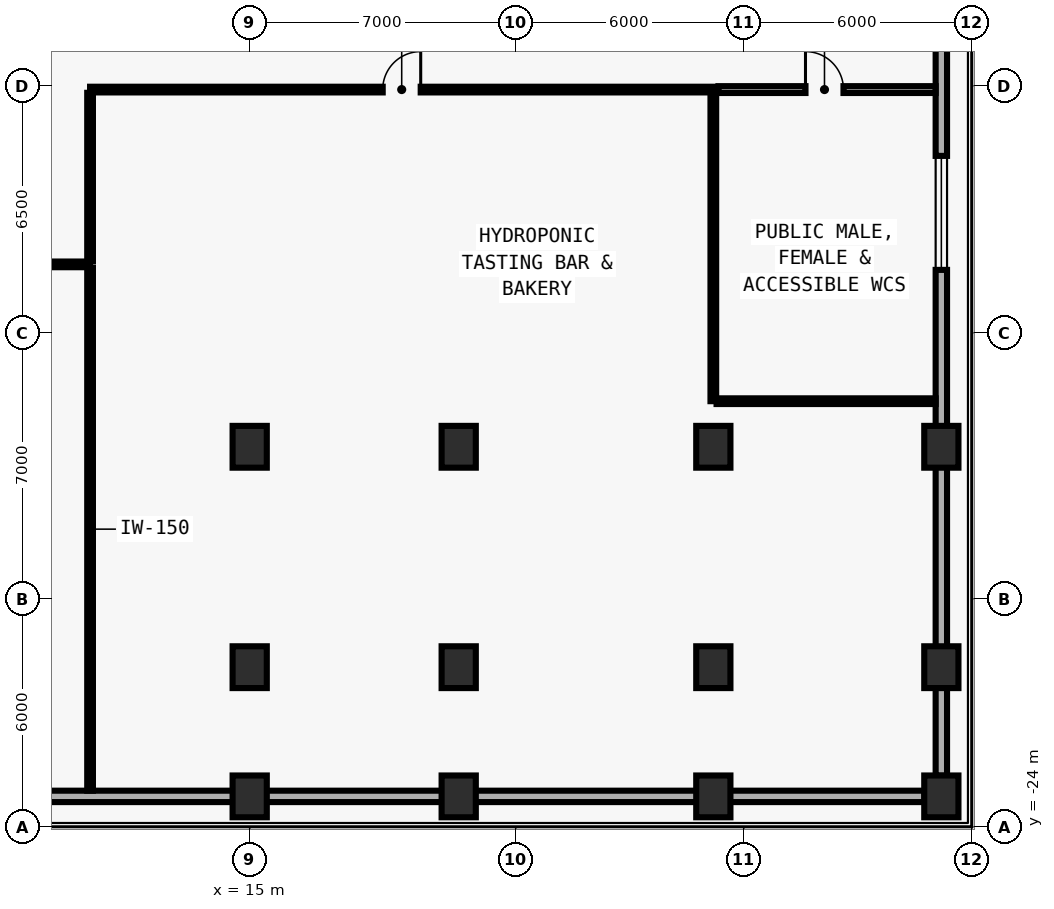
"""IFC4 building model, lengths in metres.
Left out: names, types, materials, properties, quantities, classifications, styles, units other than length and angle.
Written with IfcOpenShell. Run it as: python <this file> out.ifc"""

import sys

from ifc_helpers import new_model, si_unit, direction, frame, frame_2d, origin, origin_2d, place, context, subcontext, project, spatial, rectangle, extrude, element, fill, save


model = new_model("IFC4")
c1 = context("Model", 3, precision=1e-05, world=origin(), true_north=direction((0.0, 1.0)))
c2 = subcontext(c1, "Body", "Model", "MODEL_VIEW")
j1 = project(units=[si_unit("LENGTHUNIT", "METRE"), si_unit("PLANEANGLEUNIT", "RADIAN")], contexts=[c1])
p1 = place(None, origin())
s1 = spatial("IfcSite", under=j1, at=p1, CompositionType="ELEMENT")
p2 = place(p1, origin())
s2 = spatial("IfcBuilding", under=s1, at=p2, CompositionType="ELEMENT")
p3 = place(p2, frame((0.0, 0.0, 4.6)))
s3 = spatial("IfcBuildingStorey", under=s2, at=p3, CompositionType="ELEMENT", Elevation=4.6)
for number, where, z_axis, x_axis in (
    (1, (15.0, -23.2, 0.0), (0.0, 0.0, 1.0), (1.0, 0.0, 0.0)),
    (2, (15.0, -19.8, 0.0), (0.0, 0.0, 1.0), (1.0, 0.0, 0.0)),
    (3, (15.0, -14.0, 0.0), (0.0, 0.0, 1.0), (1.0, 0.0, 0.0)),
    (4, (20.5, -23.2, 0.0), (0.0, 0.0, 1.0), (1.0, 0.0, 0.0)),
    (5, (20.5, -19.8, 0.0), (0.0, 0.0, 1.0), (1.0, 0.0, 0.0)),
    (6, (20.5, -14.0, 0.0), (0.0, 0.0, 1.0), (1.0, 0.0, 0.0)),
    (7, (27.2, -23.2, 0.0), (0.0, 0.0, 1.0), (1.0, 0.0, 0.0)),
    (8, (27.2, -19.8, 0.0), (0.0, 0.0, 1.0), (1.0, 0.0, 0.0)),
    (9, (27.2, -14.0, 0.0), (0.0, 0.0, 1.0), (1.0, 0.0, 0.0)),
    (10, (33.2, -23.2, 0.0), (0.0, 0.0, 1.0), (1.0, 0.0, 0.0)),
    (11, (33.2, -19.8, 0.0), (0.0, 0.0, 1.0), (1.0, 0.0, 0.0)),
    (12, (33.2, -14.0, 0.0), (0.0, 0.0, 1.0), (1.0, 0.0, 0.0)),
):
    element("IfcColumn", number, at=place(p3, frame(where, z_axis=z_axis, x_axis=x_axis)), inside=s3, PredefinedType="COLUMN", context=c2, shape_type="SweptSolid", body=[
        extrude(rectangle(XDim=0.9, YDim=1.1, at=origin_2d()), origin(), (0.0, 0.0, 1.0), 4.575),
    ])
p4 = place(p3, frame((33.2, 22.655, 0.0), z_axis=(0.0, 0.0, 1.0), x_axis=(0.0, -1.0, 0.0)))
e13 = element("IfcWall", 13, at=p4, inside=s3, PredefinedType="SOLIDWALL", context=c2, shape_type="SweptSolid", body=[
    extrude(rectangle(XDim=45.31, YDim=0.3, at=frame_2d((22.655, 0.0))), origin(), (0.0, 0.0, 1.0), 3.35),
])
p5 = place(p4, frame((29.0, 0.0, 0.85)))
e14 = element("IfcOpeningElement", 14, at=p5, cuts=e13, PredefinedType="OPENING", context=c2, shape_type="SweptSolid", body=[
    extrude(rectangle(XDim=3.0, YDim=2.1, at=frame_2d((1.5, 1.05))), frame((0.0, 0.16, 0.0), z_axis=(0.0, -1.0, 0.0), x_axis=(1.0, 0.0, 0.0)), (0.0, 0.0, 1.0), 0.32),
])
p6 = place(p3, frame((32.755, -23.2, 0.0), z_axis=(0.0, 0.0, 1.0), x_axis=(-1.0, 0.0, 0.0)))
e15 = element("IfcWall", 15, at=p6, inside=s3, PredefinedType="SOLIDWALL", context=c2, shape_type="SweptSolid", body=[
    extrude(rectangle(XDim=65.51, YDim=0.3, at=frame_2d((32.755, 0.0))), origin(), (0.0, 0.0, 1.0), 3.35),
])
p7 = place(p6, frame((29.0, 0.0, 0.85)))
e16 = element("IfcOpeningElement", 16, at=p7, cuts=e15, PredefinedType="OPENING", context=c2, shape_type="SweptSolid", body=[
    extrude(rectangle(XDim=3.0, YDim=2.1, at=frame_2d((1.5, 1.05))), frame((0.0, 0.16, 0.0), z_axis=(0.0, -1.0, 0.0), x_axis=(1.0, 0.0, 0.0)), (0.0, 0.0, 1.0), 0.32),
])
p8 = place(p3, frame((10.8, -4.6, 0.0), z_axis=(0.0, 0.0, 1.0), x_axis=(1.0, 0.0, 0.0)))
e17 = element("IfcWall", 17, at=p8, inside=s3, PredefinedType="PARTITIONING", context=c2, shape_type="SweptSolid", body=[
    extrude(rectangle(XDim=16.4, YDim=0.15, at=frame_2d((8.2, 0.0))), origin(), (0.0, 0.0, 1.0), 4.28),
])
p9 = place(p8, frame((7.7, 0.0, 0.0)))
e18 = element("IfcOpeningElement", 18, at=p9, cuts=e17, PredefinedType="OPENING", context=c2, shape_type="SweptSolid", body=[
    extrude(rectangle(XDim=1.0, YDim=2.1, at=frame_2d((0.5, 1.05))), frame((0.0, 0.085, 0.0), z_axis=(0.0, -1.0, 0.0), x_axis=(1.0, 0.0, 0.0)), (0.0, 0.0, 1.0), 0.17),
])
p10 = place(p3, frame((27.335, -4.6, 0.0), z_axis=(0.0, 0.0, 1.0), x_axis=(1.0, 0.0, 0.0)))
e19 = element("IfcWall", 19, at=p10, inside=s3, PredefinedType="PLUMBINGWALL", context=c2, shape_type="SweptSolid", body=[
    extrude(rectangle(XDim=5.715, YDim=0.18, at=frame_2d((2.857, 0.0))), origin(), (0.0, 0.0, 1.0), 4.28),
])
p11 = place(p10, frame((2.29, 0.0, 0.0)))
e20 = element("IfcOpeningElement", 20, at=p11, cuts=e19, PredefinedType="OPENING", context=c2, shape_type="SweptSolid", body=[
    extrude(rectangle(XDim=1.0, YDim=2.1, at=frame_2d((0.5, 1.05))), frame((0.0, 0.1, 0.0), z_axis=(0.0, -1.0, 0.0), x_axis=(1.0, 0.0, 0.0)), (0.0, 0.0, 1.0), 0.2),
])
p12 = place(p3, frame((-4.8, -9.2, 0.0), z_axis=(0.0, 0.0, 1.0), x_axis=(1.0, 0.0, 0.0)))
e21 = element("IfcWall", 21, at=p12, inside=s3, PredefinedType="PARTITIONING", context=c2, shape_type="SweptSolid", body=[
    extrude(rectangle(XDim=15.6, YDim=0.15, at=frame_2d((7.8, 0.0))), origin(), (0.0, 0.0, 1.0), 4.28),
])
p13 = place(p12, frame((7.3, 0.0, 0.0)))
e22 = element("IfcOpeningElement", 22, at=p13, cuts=e21, PredefinedType="OPENING", context=c2, shape_type="SweptSolid", body=[
    extrude(rectangle(XDim=1.0, YDim=2.1, at=frame_2d((0.5, 1.05))), frame((0.0, 0.085, 0.0), z_axis=(0.0, -1.0, 0.0), x_axis=(1.0, 0.0, 0.0)), (0.0, 0.0, 1.0), 0.17),
])
p14 = place(p3, frame((10.8, -9.115, 0.0), z_axis=(0.0, 0.0, 1.0), x_axis=(0.0, 1.0, 0.0)))
e23 = element("IfcWall", 23, at=p14, inside=s3, PredefinedType="PARTITIONING", context=c2, shape_type="SweptSolid", body=[
    extrude(rectangle(XDim=4.43, YDim=0.15, at=frame_2d((2.215, 0.0))), origin(), (0.0, 0.0, 1.0), 4.28),
])
p15 = place(p3, frame((27.2, -4.685, 0.0), z_axis=(0.0, 0.0, 1.0), x_axis=(0.0, -1.0, 0.0)))
e24 = element("IfcWall", 24, at=p15, inside=s3, PredefinedType="PARTITIONING", context=c2, shape_type="SweptSolid", body=[
    extrude(rectangle(XDim=8.115, YDim=0.15, at=frame_2d((4.058, 0.0))), origin(), (0.0, 0.0, 1.0), 3.562),
])
p16 = place(p3, frame((27.285, -12.8, 0.0), z_axis=(0.0, 0.0, 1.0), x_axis=(1.0, 0.0, 0.0)))
e25 = element("IfcWall", 25, at=p16, inside=s3, PredefinedType="PARTITIONING", context=c2, shape_type="SweptSolid", body=[
    extrude(rectangle(XDim=5.765, YDim=0.15, at=frame_2d((2.883, 0.0))), origin(), (0.0, 0.0, 1.0), 4.28),
])
p17 = place(p3, frame((10.8, -23.05, 0.0), z_axis=(0.0, 0.0, 1.0), x_axis=(0.0, 1.0, 0.0)))
e26 = element("IfcWall", 26, at=p17, inside=s3, PredefinedType="PARTITIONING", context=c2, shape_type="SweptSolid", body=[
    extrude(rectangle(XDim=13.765, YDim=0.15, at=frame_2d((6.883, 0.0))), origin(), (0.0, 0.0, 1.0), 4.28),
])
p18 = place(p5, origin())
e27 = element("IfcWindow", 27, at=p18, inside=s3, PartitioningType="SINGLE_PANEL", PredefinedType="WINDOW", context=c2, shape_type="SweptSolid", body=[
    extrude(rectangle(XDim=3.0, YDim=2.1, at=frame_2d((1.5, 1.05))), frame((0.0, 0.03, 0.0), z_axis=(0.0, -1.0, 0.0), x_axis=(1.0, 0.0, 0.0)), (0.0, 0.0, 1.0), 0.06),
])
fill(e14, e27)
p19 = place(p9, origin())
e28 = element("IfcDoor", 28, at=p19, inside=s3, OperationType="SINGLE_SWING_RIGHT", PredefinedType="DOOR", context=c2, shape_type="SweptSolid", body=[
    extrude(rectangle(XDim=1.0, YDim=2.1, at=frame_2d((0.5, 1.05))), frame((0.0, 0.025, 0.0), z_axis=(0.0, -1.0, 0.0), x_axis=(1.0, 0.0, 0.0)), (0.0, 0.0, 1.0), 0.05),
])
fill(e18, e28)
p20 = place(p11, origin())
e29 = element("IfcDoor", 29, at=p20, inside=s3, OperationType="SINGLE_SWING_LEFT", PredefinedType="DOOR", context=c2, shape_type="SweptSolid", body=[
    extrude(rectangle(XDim=1.0, YDim=2.1, at=frame_2d((0.5, 1.05))), frame((0.0, 0.025, 0.0), z_axis=(0.0, -1.0, 0.0), x_axis=(1.0, 0.0, 0.0)), (0.0, 0.0, 1.0), 0.05),
])
fill(e20, e29)
save(model, sys.argv[1])
